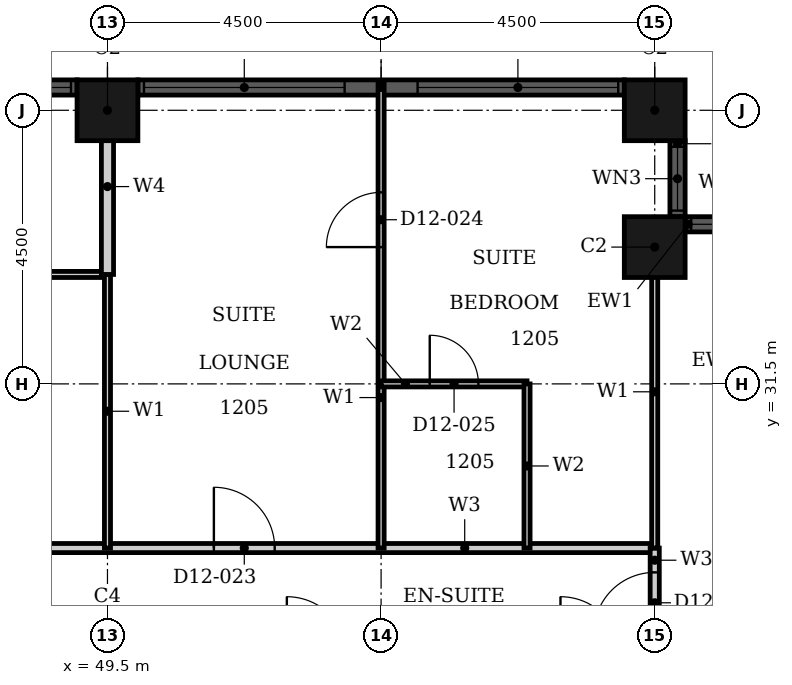
"""IFC4 building model, lengths in metres.
Left out: names, types, materials, properties, quantities, classifications, styles, units other than length and angle.
Written with IfcOpenShell. Run it as: python <this file> out.ifc"""

import sys

from ifc_helpers import new_model, si_unit, direction, frame, frame_2d, origin, origin_2d, place, context, subcontext, project, spatial, rectangle, hollow_rectangle, extrude, element, fill, save


model = new_model("IFC4")
c1 = context("Model", 3, precision=1e-05, world=origin(), true_north=direction((0.0, 1.0)))
c2 = subcontext(c1, "Body", "Model", "MODEL_VIEW")
j1 = project(units=[si_unit("LENGTHUNIT", "METRE"), si_unit("PLANEANGLEUNIT", "RADIAN")], contexts=[c1])
p1 = place(None, origin())
s1 = spatial("IfcSite", under=j1, at=p1, CompositionType="ELEMENT")
p2 = place(p1, origin())
s2 = spatial("IfcBuilding", under=s1, at=p2, CompositionType="ELEMENT")
p3 = place(p2, frame((0.0, 0.0, 56.4)))
s3 = spatial("IfcBuildingStorey", under=s2, at=p3, CompositionType="ELEMENT", Elevation=56.4)
for number, where, z_axis, x_axis in (
    (1, (58.5, 33.75, 0.0), (0.0, 0.0, 1.0), (1.0, 0.0, 0.0)),
    (2, (58.5, 36.0, 0.0), (0.0, 0.0, 1.0), (1.0, 0.0, 0.0)),
    (3, (49.5, 36.0, 0.0), (0.0, 0.0, 1.0), (1.0, 0.0, 0.0)),
):
    element("IfcColumn", number, at=place(p3, frame(where, z_axis=z_axis, x_axis=x_axis)), inside=s3, PredefinedType="COLUMN", context=c2, shape_type="SweptSolid", body=[
        extrude(hollow_rectangle(XDim=1.0, YDim=1.0, WallThickness=0.032, at=origin_2d()), origin(), (0.0, 0.0, 1.0), 3.6),
    ])
p4 = place(p3, frame((60.25, 34.125, 0.0), z_axis=(0.0, 0.0, 1.0), x_axis=(-1.0, 0.0, 0.0)))
e4 = element("IfcWall", 4, at=p4, inside=s3, PredefinedType="SOLIDWALL", context=c2, shape_type="SweptSolid", body=[
    extrude(rectangle(XDim=1.25, YDim=0.25, at=frame_2d((0.625, 0.0))), origin(), (0.0, 0.0, 1.0), 3.6),
])
p5 = place(p4, frame((0.1, 0.0, 0.9)))
e5 = element("IfcOpeningElement", 5, at=p5, cuts=e4, PredefinedType="OPENING", context=c2, shape_type="SweptSolid", body=[
    extrude(rectangle(XDim=1.05, YDim=2.08, at=frame_2d((0.525, 1.04))), frame((0.0, 0.135, 0.0), z_axis=(0.0, -1.0, 0.0), x_axis=(1.0, 0.0, 0.0)), (0.0, 0.0, 1.0), 0.27),
])
p6 = place(p3, frame((58.875, 34.25, 0.0), z_axis=(0.0, 0.0, 1.0), x_axis=(0.0, 1.0, 0.0)))
e6 = element("IfcWall", 6, at=p6, inside=s3, PredefinedType="SOLIDWALL", context=c2, shape_type="SweptSolid", body=[
    extrude(rectangle(XDim=1.25, YDim=0.25, at=frame_2d((0.625, 0.0))), origin(), (0.0, 0.0, 1.0), 3.6),
])
p7 = place(p6, frame((0.1, 0.0, 0.9)))
e7 = element("IfcOpeningElement", 7, at=p7, cuts=e6, PredefinedType="OPENING", context=c2, shape_type="SweptSolid", body=[
    extrude(rectangle(XDim=1.05, YDim=2.08, at=frame_2d((0.525, 1.04))), frame((0.0, 0.135, 0.0), z_axis=(0.0, -1.0, 0.0), x_axis=(1.0, 0.0, 0.0)), (0.0, 0.0, 1.0), 0.27),
])
p8 = place(p3, frame((58.0, 36.375, 0.0), z_axis=(0.0, 0.0, 1.0), x_axis=(-1.0, 0.0, 0.0)))
e8 = element("IfcWall", 8, at=p8, inside=s3, PredefinedType="SOLIDWALL", context=c2, shape_type="SweptSolid", body=[
    extrude(rectangle(XDim=8.0, YDim=0.25, at=frame_2d((4.0, 0.0))), origin(), (0.0, 0.0, 1.0), 3.6),
])
p9 = place(p8, frame((0.1, 0.0, 0.9)))
e9 = element("IfcOpeningElement", 9, at=p9, cuts=e8, PredefinedType="OPENING", context=c2, shape_type="SweptSolid", body=[
    extrude(rectangle(XDim=3.3, YDim=2.08, at=frame_2d((1.65, 1.04))), frame((0.0, 0.135, 0.0), z_axis=(0.0, -1.0, 0.0), x_axis=(1.0, 0.0, 0.0)), (0.0, 0.0, 1.0), 0.27),
])
p10 = place(p8, frame((4.6, 0.0, 0.9)))
e10 = element("IfcOpeningElement", 10, at=p10, cuts=e8, PredefinedType="OPENING", context=c2, shape_type="SweptSolid", body=[
    extrude(rectangle(XDim=3.3, YDim=2.08, at=frame_2d((1.65, 1.04))), frame((0.0, 0.135, 0.0), z_axis=(0.0, -1.0, 0.0), x_axis=(1.0, 0.0, 0.0)), (0.0, 0.0, 1.0), 0.27),
])
p11 = place(p3, frame((49.0, 36.375, 0.0), z_axis=(0.0, 0.0, 1.0), x_axis=(-1.0, 0.0, 0.0)))
e11 = element("IfcWall", 11, at=p11, inside=s3, PredefinedType="SOLIDWALL", context=c2, shape_type="SweptSolid", body=[
    extrude(rectangle(XDim=1.25, YDim=0.25, at=frame_2d((0.625, 0.0))), origin(), (0.0, 0.0, 1.0), 3.6),
])
p12 = place(p11, frame((0.1, 0.0, 0.9)))
e12 = element("IfcOpeningElement", 12, at=p12, cuts=e11, PredefinedType="OPENING", context=c2, shape_type="SweptSolid", body=[
    extrude(rectangle(XDim=1.05, YDim=2.08, at=frame_2d((0.525, 1.04))), frame((0.0, 0.135, 0.0), z_axis=(0.0, -1.0, 0.0), x_axis=(1.0, 0.0, 0.0)), (0.0, 0.0, 1.0), 0.27),
])
p13 = place(p3, frame((46.8, 28.8, 0.0), z_axis=(0.0, 0.0, 1.0), x_axis=(1.0, 0.0, 0.0)))
e13 = element("IfcWall", 13, at=p13, inside=s3, PredefinedType="PARTITIONING", context=c2, shape_type="SweptSolid", body=[
    extrude(rectangle(XDim=11.7, YDim=0.15, at=frame_2d((5.85, 0.0))), origin(), (0.0, 0.0, 1.0), 3.3),
])
p14 = place(p13, frame((4.45, 0.0, 0.0)))
e14 = element("IfcOpeningElement", 14, at=p14, cuts=e13, PredefinedType="OPENING", context=c2, shape_type="SweptSolid", body=[
    extrude(rectangle(XDim=1.0, YDim=2.1, at=frame_2d((0.5, 1.05))), frame((0.0, 0.085, 0.0), z_axis=(0.0, -1.0, 0.0), x_axis=(1.0, 0.0, 0.0)), (0.0, 0.0, 1.0), 0.17),
])
p15 = place(p3, frame((58.5, 27.0, 0.0), z_axis=(0.0, 0.0, 1.0), x_axis=(0.0, 1.0, 0.0)))
e15 = element("IfcWall", 15, at=p15, inside=s3, PredefinedType="PARTITIONING", context=c2, shape_type="SweptSolid", body=[
    extrude(rectangle(XDim=1.8, YDim=0.15, at=frame_2d((0.9, 0.0))), origin(), (0.0, 0.0, 1.0), 3.3),
])
p16 = place(p15, frame((0.4, 0.0, 0.0)))
e16 = element("IfcOpeningElement", 16, at=p16, cuts=e15, PredefinedType="OPENING", context=c2, shape_type="SweptSolid", body=[
    extrude(rectangle(XDim=1.0, YDim=2.1, at=frame_2d((0.5, 1.05))), frame((0.0, 0.085, 0.0), z_axis=(0.0, -1.0, 0.0), x_axis=(1.0, 0.0, 0.0)), (0.0, 0.0, 1.0), 0.17),
])
p17 = place(p3, frame((46.8, 33.3, 0.0), z_axis=(0.0, 0.0, 1.0), x_axis=(1.0, 0.0, 0.0)))
e17 = element("IfcWall", 17, at=p17, inside=s3, PredefinedType="PARTITIONING", context=c2, shape_type="SweptSolid", body=[
    extrude(rectangle(XDim=2.7, YDim=0.1, at=frame_2d((1.35, 0.0))), origin(), (0.0, 0.0, 1.0), 3.3),
])
p18 = place(p3, frame((49.5, 28.8, 0.0), z_axis=(0.0, 0.0, 1.0), x_axis=(0.0, 1.0, 0.0)))
e18 = element("IfcWall", 18, at=p18, inside=s3, PredefinedType="PARTITIONING", context=c2, shape_type="SweptSolid", body=[
    extrude(rectangle(XDim=4.5, YDim=0.1, at=frame_2d((2.25, 0.0))), origin(), (0.0, 0.0, 1.0), 2.38),
])
p19 = place(p3, frame((54.0, 28.8, 0.0), z_axis=(0.0, 0.0, 1.0), x_axis=(0.0, 1.0, 0.0)))
e19 = element("IfcWall", 19, at=p19, inside=s3, PredefinedType="PARTITIONING", context=c2, shape_type="SweptSolid", body=[
    extrude(rectangle(XDim=7.64, YDim=0.1, at=frame_2d((3.82, 0.0))), origin(), (0.0, 0.0, 1.0), 3.3),
])
p20 = place(p19, frame((4.95, 0.0, 0.0)))
e20 = element("IfcOpeningElement", 20, at=p20, cuts=e19, PredefinedType="OPENING", context=c2, shape_type="SweptSolid", body=[
    extrude(rectangle(XDim=0.9, YDim=2.1, at=frame_2d((0.45, 1.05))), frame((0.0, 0.06, 0.0), z_axis=(0.0, -1.0, 0.0), x_axis=(1.0, 0.0, 0.0)), (0.0, 0.0, 1.0), 0.12),
])
p21 = place(p3, frame((58.5, 28.8, 0.0), z_axis=(0.0, 0.0, 1.0), x_axis=(0.0, 1.0, 0.0)))
e21 = element("IfcWall", 21, at=p21, inside=s3, PredefinedType="PARTITIONING", context=c2, shape_type="SweptSolid", body=[
    extrude(rectangle(XDim=5.14, YDim=0.1, at=frame_2d((2.57, 0.0))), origin(), (0.0, 0.0, 1.0), 3.3),
])
p22 = place(p3, frame((49.5, 33.3, 0.0), z_axis=(0.0, 0.0, 1.0), x_axis=(0.0, 1.0, 0.0)))
e22 = element("IfcWall", 22, at=p22, inside=s3, PredefinedType="PARTITIONING", context=c2, shape_type="SweptSolid", body=[
    extrude(rectangle(XDim=2.89, YDim=0.2, at=frame_2d((1.445, 0.0))), origin(), (0.0, 0.0, 1.0), 2.38),
])
p23 = place(p3, frame((54.0, 31.5, 0.0), z_axis=(0.0, 0.0, 1.0), x_axis=(1.0, 0.0, 0.0)))
e23 = element("IfcWall", 23, at=p23, inside=s3, PredefinedType="PARTITIONING", context=c2, shape_type="SweptSolid", body=[
    extrude(rectangle(XDim=2.4, YDim=0.1, at=frame_2d((1.2, 0.0))), origin(), (0.0, 0.0, 1.0), 2.58),
])
p24 = place(p23, frame((0.8, 0.0, 0.0)))
e24 = element("IfcOpeningElement", 24, at=p24, cuts=e23, PredefinedType="OPENING", context=c2, shape_type="SweptSolid", body=[
    extrude(rectangle(XDim=0.8, YDim=2.1, at=frame_2d((0.4, 1.05))), frame((0.0, 0.06, 0.0), z_axis=(0.0, -1.0, 0.0), x_axis=(1.0, 0.0, 0.0)), (0.0, 0.0, 1.0), 0.12),
])
p25 = place(p3, frame((56.4, 28.8, 0.0), z_axis=(0.0, 0.0, 1.0), x_axis=(0.0, 1.0, 0.0)))
e25 = element("IfcWall", 25, at=p25, inside=s3, PredefinedType="PARTITIONING", context=c2, shape_type="SweptSolid", body=[
    extrude(rectangle(XDim=2.7, YDim=0.1, at=frame_2d((1.35, 0.0))), origin(), (0.0, 0.0, 1.0), 3.3),
])
p26 = place(p5, origin())
e26 = element("IfcWindow", 26, at=p26, inside=s3, PartitioningType="SINGLE_PANEL", PredefinedType="WINDOW", context=c2, shape_type="SweptSolid", body=[
    extrude(rectangle(XDim=1.05, YDim=2.08, at=frame_2d((0.525, 1.04))), frame((0.0, 0.03, 0.0), z_axis=(0.0, -1.0, 0.0), x_axis=(1.0, 0.0, 0.0)), (0.0, 0.0, 1.0), 0.06),
])
fill(e5, e26)
p27 = place(p7, origin())
e27 = element("IfcWindow", 27, at=p27, inside=s3, PartitioningType="SINGLE_PANEL", PredefinedType="WINDOW", context=c2, shape_type="SweptSolid", body=[
    extrude(rectangle(XDim=1.05, YDim=2.08, at=frame_2d((0.525, 1.04))), frame((0.0, 0.03, 0.0), z_axis=(0.0, -1.0, 0.0), x_axis=(1.0, 0.0, 0.0)), (0.0, 0.0, 1.0), 0.06),
])
fill(e7, e27)
p28 = place(p9, origin())
e28 = element("IfcWindow", 28, at=p28, inside=s3, PartitioningType="SINGLE_PANEL", PredefinedType="WINDOW", context=c2, shape_type="SweptSolid", body=[
    extrude(rectangle(XDim=3.3, YDim=2.08, at=frame_2d((1.65, 1.04))), frame((0.0, 0.03, 0.0), z_axis=(0.0, -1.0, 0.0), x_axis=(1.0, 0.0, 0.0)), (0.0, 0.0, 1.0), 0.06),
])
fill(e9, e28)
p29 = place(p10, origin())
e29 = element("IfcWindow", 29, at=p29, inside=s3, PartitioningType="SINGLE_PANEL", PredefinedType="WINDOW", context=c2, shape_type="SweptSolid", body=[
    extrude(rectangle(XDim=3.3, YDim=2.08, at=frame_2d((1.65, 1.04))), frame((0.0, 0.03, 0.0), z_axis=(0.0, -1.0, 0.0), x_axis=(1.0, 0.0, 0.0)), (0.0, 0.0, 1.0), 0.06),
])
fill(e10, e29)
p30 = place(p12, origin())
e30 = element("IfcWindow", 30, at=p30, inside=s3, PartitioningType="SINGLE_PANEL", PredefinedType="WINDOW", context=c2, shape_type="SweptSolid", body=[
    extrude(rectangle(XDim=1.05, YDim=2.08, at=frame_2d((0.525, 1.04))), frame((0.0, 0.03, 0.0), z_axis=(0.0, -1.0, 0.0), x_axis=(1.0, 0.0, 0.0)), (0.0, 0.0, 1.0), 0.06),
])
fill(e12, e30)
p31 = place(p14, origin())
e31 = element("IfcDoor", 31, at=p31, inside=s3, OperationType="SINGLE_SWING_RIGHT", PredefinedType="DOOR", context=c2, shape_type="SweptSolid", body=[
    extrude(rectangle(XDim=1.0, YDim=2.1, at=frame_2d((0.5, 1.05))), frame((0.0, 0.025, 0.0), z_axis=(0.0, -1.0, 0.0), x_axis=(1.0, 0.0, 0.0)), (0.0, 0.0, 1.0), 0.05),
])
fill(e14, e31)
p32 = place(p20, origin())
e32 = element("IfcDoor", 32, at=p32, inside=s3, OperationType="SINGLE_SWING_RIGHT", PredefinedType="DOOR", context=c2, shape_type="SweptSolid", body=[
    extrude(rectangle(XDim=0.9, YDim=2.1, at=frame_2d((0.45, 1.05))), frame((0.0, 0.025, 0.0), z_axis=(0.0, -1.0, 0.0), x_axis=(1.0, 0.0, 0.0)), (0.0, 0.0, 1.0), 0.05),
])
fill(e20, e32)
p33 = place(p24, origin())
e33 = element("IfcDoor", 33, at=p33, inside=s3, OperationType="SINGLE_SWING_RIGHT", PredefinedType="DOOR", context=c2, shape_type="SweptSolid", body=[
    extrude(rectangle(XDim=0.8, YDim=2.1, at=frame_2d((0.4, 1.05))), frame((0.0, 0.025, 0.0), z_axis=(0.0, -1.0, 0.0), x_axis=(1.0, 0.0, 0.0)), (0.0, 0.0, 1.0), 0.05),
])
fill(e24, e33)
p34 = place(p16, origin())
e34 = element("IfcDoor", 34, at=p34, inside=s3, OperationType="SINGLE_SWING_RIGHT", PredefinedType="DOOR", context=c2, shape_type="SweptSolid", body=[
    extrude(rectangle(XDim=1.0, YDim=2.1, at=frame_2d((0.5, 1.05))), frame((0.0, 0.025, 0.0), z_axis=(0.0, -1.0, 0.0), x_axis=(1.0, 0.0, 0.0)), (0.0, 0.0, 1.0), 0.05),
])
fill(e16, e34)
save(model, sys.argv[1])
